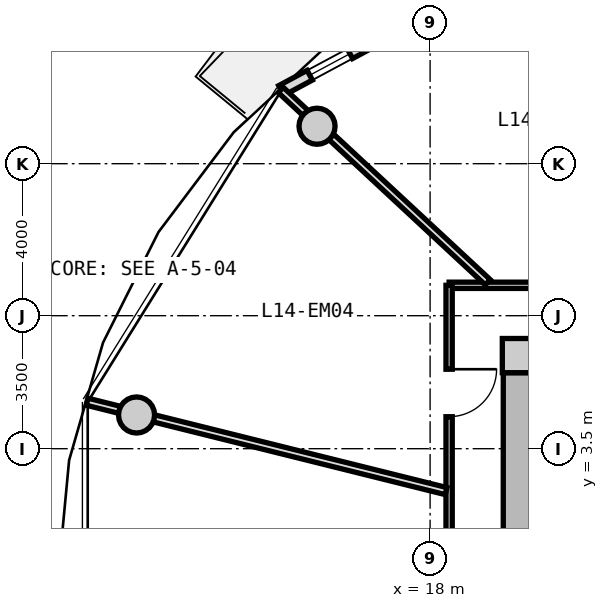
"""IFC4 building model, lengths in metres.
Left out: names, types, materials, properties, quantities, classifications, styles, units other than length and angle.
Written with IfcOpenShell. Run it as: python <this file> out.ifc"""

import sys

from ifc_helpers import new_model, si_unit, direction, frame, frame_2d, origin, origin_2d, place, context, subcontext, project, spatial, rectangle, circle, extrude, source, transform, mapped, element, fill, save


model = new_model("IFC4")
c1 = context("Model", 3, precision=1e-05, world=origin(), true_north=direction((0.0, 1.0)))
c2 = subcontext(c1, "Body", "Model", "MODEL_VIEW")
j1 = project(units=[si_unit("LENGTHUNIT", "METRE"), si_unit("PLANEANGLEUNIT", "RADIAN")], contexts=[c1])
p1 = place(None, origin())
s1 = spatial("IfcSite", under=j1, at=p1, CompositionType="ELEMENT")
p2 = place(p1, origin())
s2 = spatial("IfcBuilding", under=s1, at=p2, CompositionType="ELEMENT")
p3 = place(p2, frame((0.0, 0.0, 49.05)))
s3 = spatial("IfcBuildingStorey", under=s2, at=p3, CompositionType="ELEMENT", Elevation=49.05)
m1 = source(origin(), c2, "Body", "SweptSolid", [
    extrude(rectangle(XDim=0.9, YDim=0.9, at=origin_2d()), origin(), (0.0, 0.0, 1.0), 3.05),
])
p4 = place(p3, frame((20.35, 5.95, 0.0), z_axis=(0.0, 0.0, 1.0), x_axis=(1.0, 0.0, 0.0)))
e1 = element("IfcColumn", 1, at=p4, inside=s3, PredefinedType="COLUMN", context=c2, shape_type="MappedRepresentation", body=[
    mapped(m1, transform((0.0, 0.0, 0.0), x_axis=(1.0, 0.0, 0.0), y_axis=(0.0, 1.0, 0.0), z_axis=(0.0, 0.0, 1.0), scale=1.0)),
])
m2 = source(origin(), c2, "Body", "SweptSolid", [
    extrude(rectangle(XDim=11.0, YDim=0.85, at=frame_2d((5.5, 0.0))), origin(), (0.0, 0.0, 1.0), 2.79),
])
p5 = place(p3, frame((20.35, -5.5, 0.0), z_axis=(0.0, 0.0, 1.0), x_axis=(0.0, 1.0, 0.0)))
e2 = element("IfcWall", 2, at=p5, inside=s3, PredefinedType="SHEAR", context=c2, shape_type="MappedRepresentation", body=[
    mapped(m2, transform((0.0, 0.0, 0.0), x_axis=(1.0, 0.0, 0.0), y_axis=(0.0, 1.0, 0.0), z_axis=(0.0, 0.0, 1.0), scale=1.0)),
])
p6 = place(p5, frame((3.8, 0.0, 0.0)))
e3 = element("IfcOpeningElement", 3, at=p6, cuts=e2, PredefinedType="OPENING", context=c2, shape_type="SweptSolid", body=[
    extrude(rectangle(XDim=1.2, YDim=2.15, at=frame_2d((0.6, 1.075))), frame((0.0, 0.435, 0.0), z_axis=(0.0, -1.0, 0.0), x_axis=(1.0, 0.0, 0.0)), (0.0, 0.0, 1.0), 0.87),
])
m3 = source(origin(), c2, "Body", "SweptSolid", [
    extrude(circle(Radius=0.475, at=origin_2d()), origin(), (0.0, 0.0, 1.0), 3.05),
])
for number, where, z_axis, x_axis in (
    (4, (15.025, 11.985, 0.0), (0.0, 0.0, 1.0), (1.0, 0.0, 0.0)),
    (5, (10.275, 4.387, 0.0), (0.0, 0.0, 1.0), (1.0, 0.0, 0.0)),
):
    element("IfcColumn", number, at=place(p3, frame(where, z_axis=z_axis, x_axis=x_axis)), inside=s3, PredefinedType="COLUMN", context=c2, shape_type="MappedRepresentation", body=[
        mapped(m3, transform((0.0, 0.0, 0.0), x_axis=(1.0, 0.0, 0.0), y_axis=(0.0, 1.0, 0.0), z_axis=(0.0, 0.0, 1.0), scale=1.0)),
    ])
m4 = source(origin(), c2, "Body", "SweptSolid", [
    extrude(rectangle(XDim=10.011, YDim=0.29, at=frame_2d((5.005, 0.0))), origin(), (0.0, 0.0, 1.0), 2.79),
])
p7 = place(p3, frame((14.084, 12.926, 0.0), z_axis=(0.0, 0.0, 1.0), x_axis=(0.881272505317, 0.472608475773, 0.0)))
e6 = element("IfcWall", 6, at=p7, inside=s3, PredefinedType="SOLIDWALL", context=c2, shape_type="MappedRepresentation", body=[
    mapped(m4, transform((0.0, 0.0, 0.0), x_axis=(1.0, 0.0, 0.0), y_axis=(0.0, 1.0, 0.0), z_axis=(0.0, 0.0, 1.0), scale=1.0)),
])
p8 = place(p7, frame((7.86, 0.0, 0.0)))
e7 = element("IfcOpeningElement", 7, at=p8, cuts=e6, PredefinedType="OPENING", context=c2, shape_type="SweptSolid", body=[
    extrude(rectangle(XDim=1.15, YDim=2.25, at=frame_2d((0.575, 1.125))), frame((0.0, 0.155, 0.0), z_axis=(0.0, -1.0, 0.0), x_axis=(1.0, 0.0, 0.0)), (0.0, 0.0, 1.0), 0.31),
])
p9 = place(p7, frame((0.85, 0.0, 0.85)))
e8 = element("IfcOpeningElement", 8, at=p9, cuts=e6, PredefinedType="OPENING", context=c2, shape_type="SweptSolid", body=[
    extrude(rectangle(XDim=1.2, YDim=1.5, at=frame_2d((0.6, 0.75))), frame((0.0, 0.155, 0.0), z_axis=(0.0, -1.0, 0.0), x_axis=(1.0, 0.0, 0.0)), (0.0, 0.0, 1.0), 0.31),
])
m5 = source(origin(), c2, "Body", "SweptSolid", [
    extrude(rectangle(XDim=19.0, YDim=0.165, at=frame_2d((9.5, 0.0))), origin(), (0.0, 0.0, 1.0), 2.775),
])
p10 = place(p3, frame((18.5, 7.8, 0.0), z_axis=(0.0, 0.0, 1.0), x_axis=(1.0, 0.0, 0.0)))
e9 = element("IfcWall", 9, at=p10, inside=s3, PredefinedType="PARTITIONING", context=c2, shape_type="MappedRepresentation", body=[
    mapped(m5, transform((0.0, 0.0, 0.0), x_axis=(1.0, 0.0, 0.0), y_axis=(0.0, 1.0, 0.0), z_axis=(0.0, 0.0, 1.0), scale=1.0)),
])
p11 = place(p10, frame((16.214, 0.0, 0.0)))
e10 = element("IfcOpeningElement", 10, at=p11, cuts=e9, PredefinedType="OPENING", context=c2, shape_type="SweptSolid", body=[
    extrude(rectangle(XDim=0.92, YDim=2.1, at=frame_2d((0.46, 1.05))), frame((0.0, 0.093, 0.0), z_axis=(0.0, -1.0, 0.0), x_axis=(1.0, 0.0, 0.0)), (0.0, 0.0, 1.0), 0.185),
])
p12 = place(p10, frame((13.063, 0.0, 0.0)))
e11 = element("IfcOpeningElement", 11, at=p12, cuts=e9, PredefinedType="OPENING", context=c2, shape_type="SweptSolid", body=[
    extrude(rectangle(XDim=0.92, YDim=2.1, at=frame_2d((0.46, 1.05))), frame((0.0, 0.093, 0.0), z_axis=(0.0, -1.0, 0.0), x_axis=(1.0, 0.0, 0.0)), (0.0, 0.0, 1.0), 0.185),
])
p13 = place(p10, frame((8.875, 0.0, 0.0)))
e12 = element("IfcOpeningElement", 12, at=p13, cuts=e9, PredefinedType="OPENING", context=c2, shape_type="SweptSolid", body=[
    extrude(rectangle(XDim=1.25, YDim=2.2, at=frame_2d((0.625, 1.1))), frame((0.0, 0.093, 0.0), z_axis=(0.0, -1.0, 0.0), x_axis=(1.0, 0.0, 0.0)), (0.0, 0.0, 1.0), 0.185),
])
p14 = place(p10, frame((3.506, 0.0, 0.0)))
e13 = element("IfcOpeningElement", 13, at=p14, cuts=e9, PredefinedType="OPENING", context=c2, shape_type="SweptSolid", body=[
    extrude(rectangle(XDim=1.25, YDim=2.2, at=frame_2d((0.625, 1.1))), frame((0.0, 0.093, 0.0), z_axis=(0.0, -1.0, 0.0), x_axis=(1.0, 0.0, 0.0)), (0.0, 0.0, 1.0), 0.185),
])
m6 = source(origin(), c2, "Body", "SweptSolid", [
    extrude(rectangle(XDim=15.6, YDim=0.165, at=frame_2d((7.8, 0.0))), origin(), (0.0, 0.0, 1.0), 2.775),
])
p15 = place(p3, frame((18.5, -7.8, 0.0), z_axis=(0.0, 0.0, 1.0), x_axis=(0.0, 1.0, 0.0)))
e14 = element("IfcWall", 14, at=p15, inside=s3, PredefinedType="PARTITIONING", context=c2, shape_type="MappedRepresentation", body=[
    mapped(m6, transform((0.0, 0.0, 0.0), x_axis=(1.0, 0.0, 0.0), y_axis=(0.0, 1.0, 0.0), z_axis=(0.0, 0.0, 1.0), scale=1.0)),
])
p16 = place(p15, frame((12.141, 0.0, 0.0)))
e15 = element("IfcOpeningElement", 15, at=p16, cuts=e14, PredefinedType="OPENING", context=c2, shape_type="SweptSolid", body=[
    extrude(rectangle(XDim=1.25, YDim=2.2, at=frame_2d((0.625, 1.1))), frame((0.0, 0.093, 0.0), z_axis=(0.0, -1.0, 0.0), x_axis=(1.0, 0.0, 0.0)), (0.0, 0.0, 1.0), 0.185),
])
p17 = place(p15, frame((7.175, 0.0, 0.0)))
e16 = element("IfcOpeningElement", 16, at=p17, cuts=e14, PredefinedType="OPENING", context=c2, shape_type="SweptSolid", body=[
    extrude(rectangle(XDim=1.25, YDim=2.2, at=frame_2d((0.625, 1.1))), frame((0.0, 0.093, 0.0), z_axis=(0.0, -1.0, 0.0), x_axis=(1.0, 0.0, 0.0)), (0.0, 0.0, 1.0), 0.185),
])
p18 = place(p15, frame((2.208, 0.0, 0.0)))
e17 = element("IfcOpeningElement", 17, at=p18, cuts=e14, PredefinedType="OPENING", context=c2, shape_type="SweptSolid", body=[
    extrude(rectangle(XDim=1.25, YDim=2.2, at=frame_2d((0.625, 1.1))), frame((0.0, 0.093, 0.0), z_axis=(0.0, -1.0, 0.0), x_axis=(1.0, 0.0, 0.0)), (0.0, 0.0, 1.0), 0.185),
])
m7 = source(origin(), c2, "Body", "SweptSolid", [
    extrude(rectangle(XDim=7.435, YDim=0.19, at=frame_2d((3.717, 0.0))), origin(), (0.0, 0.0, 1.0), 2.225),
])
p19 = place(p3, frame((19.517, 7.88, 0.0), z_axis=(0.0, 0.0, 1.0), x_axis=(-0.732651956848, 0.680603489652, 0.0)))
e18 = element("IfcWall", 18, at=p19, inside=s3, PredefinedType="PARTITIONING", context=c2, shape_type="MappedRepresentation", body=[
    mapped(m7, transform((0.0, 0.0, 0.0), x_axis=(1.0, 0.0, 0.0), y_axis=(0.0, 1.0, 0.0), z_axis=(0.0, 0.0, 1.0), scale=1.0)),
])
m8 = source(origin(), c2, "Body", "SweptSolid", [
    extrude(rectangle(XDim=9.737, YDim=0.19, at=frame_2d((4.869, 0.0))), origin(), (0.0, 0.0, 1.0), 2.225),
])
p20 = place(p3, frame((18.42, 2.385, 0.0), z_axis=(0.0, 0.0, 1.0), x_axis=(-0.970392716238, 0.241532557375, 0.0)))
e19 = element("IfcWall", 19, at=p20, inside=s3, PredefinedType="PARTITIONING", context=c2, shape_type="MappedRepresentation", body=[
    mapped(m8, transform((0.0, 0.0, 0.0), x_axis=(1.0, 0.0, 0.0), y_axis=(0.0, 1.0, 0.0), z_axis=(0.0, 0.0, 1.0), scale=1.0)),
])
m9 = source(origin(), c2, "Body", "SweptSolid", [
    extrude(rectangle(XDim=1.2, YDim=1.5, at=frame_2d((0.6, 0.75))), frame((0.0, 0.03, 0.0), z_axis=(0.0, -1.0, 0.0), x_axis=(1.0, 0.0, 0.0)), (0.0, 0.0, 1.0), 0.06),
])
p21 = place(p9, origin())
e20 = element("IfcWindow", 20, at=p21, inside=s3, PartitioningType="SINGLE_PANEL", PredefinedType="WINDOW", context=c2, shape_type="MappedRepresentation", body=[
    mapped(m9, transform((0.0, 0.0, 0.0), x_axis=(1.0, 0.0, 0.0), y_axis=(0.0, 1.0, 0.0), z_axis=(0.0, 0.0, 1.0), scale=1.0)),
])
fill(e8, e20)
m10 = source(origin(), c2, "Body", "SweptSolid", [
    extrude(rectangle(XDim=1.25, YDim=2.2, at=frame_2d((0.625, 1.1))), frame((0.0, 0.025, 0.0), z_axis=(0.0, -1.0, 0.0), x_axis=(1.0, 0.0, 0.0)), (0.0, 0.0, 1.0), 0.05),
])
p22 = place(p16, frame((1.25, 0.0, 0.0), z_axis=(0.0, 0.0, 1.0), x_axis=(-1.0, 0.0, 0.0)))
e21 = element("IfcDoor", 21, at=p22, inside=s3, OperationType="SINGLE_SWING_LEFT", PredefinedType="DOOR", context=c2, shape_type="MappedRepresentation", body=[
    mapped(m10, transform((0.0, 0.0, 0.0), x_axis=(1.0, 0.0, 0.0), y_axis=(0.0, 1.0, 0.0), z_axis=(0.0, 0.0, 1.0), scale=1.0)),
])
fill(e15, e21)
save(model, sys.argv[1])
